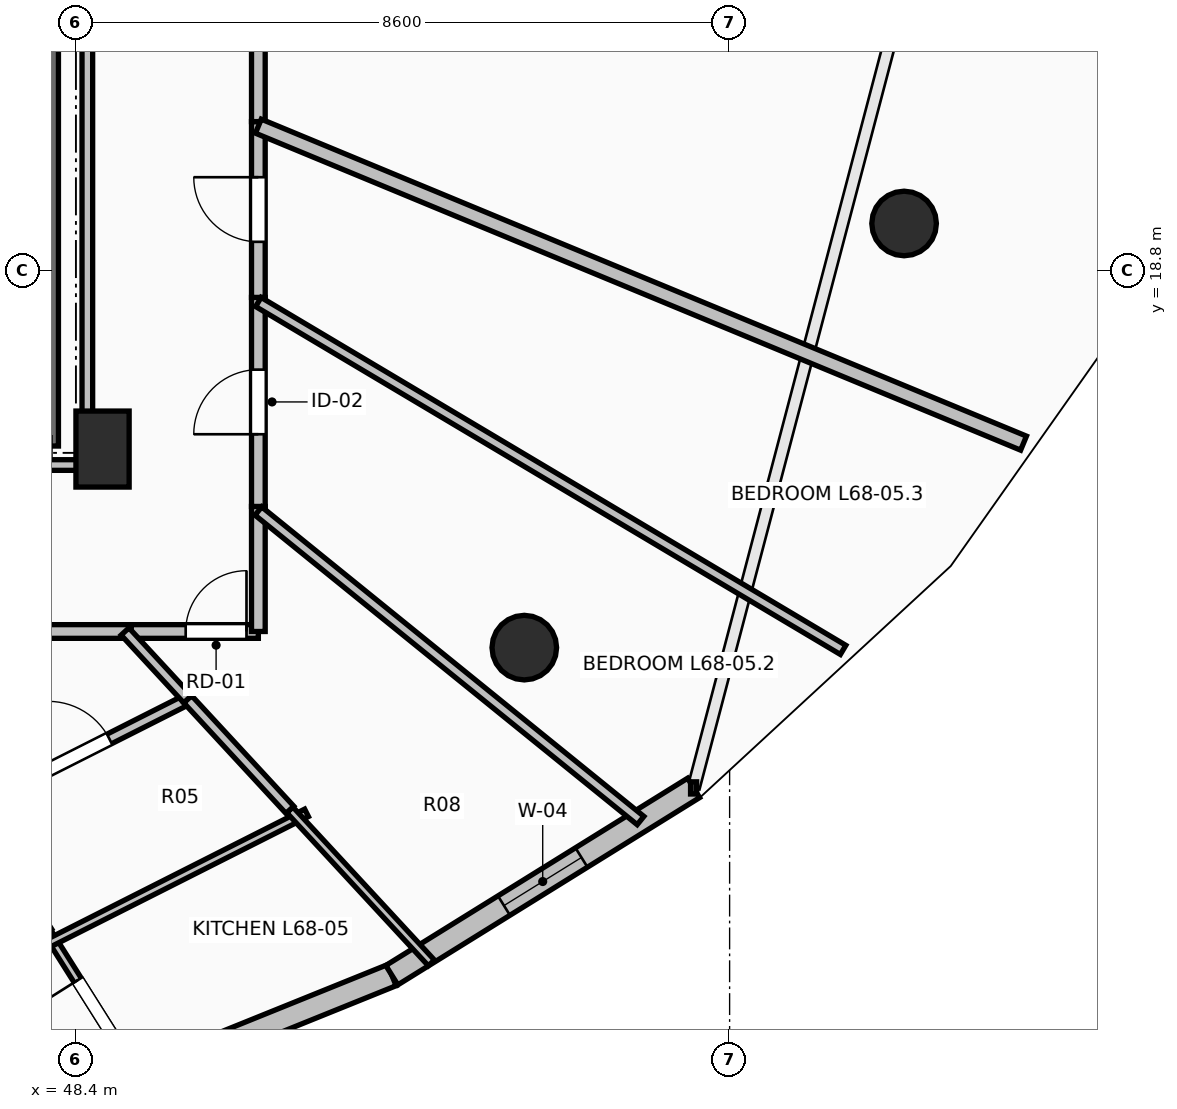
"""IFC4 building model, lengths in metres.
Left out: names, types, materials, properties, quantities, classifications, styles, units other than length and angle.
Written with IfcOpenShell. Run it as: python <this file> out.ifc"""

import sys

from ifc_helpers import new_model, si_unit, direction, frame, frame_2d, origin, origin_2d, place, context, subcontext, project, spatial, rectangle, circle, extrude, element, fill, save


model = new_model("IFC4")
c1 = context("Model", 3, precision=1e-05, world=origin(), true_north=direction((0.0, 1.0)))
c2 = subcontext(c1, "Body", "Model", "MODEL_VIEW")
j1 = project(units=[si_unit("LENGTHUNIT", "METRE"), si_unit("PLANEANGLEUNIT", "RADIAN")], contexts=[c1])
p1 = place(None, origin())
s1 = spatial("IfcSite", under=j1, at=p1, CompositionType="ELEMENT")
p2 = place(p1, origin())
s2 = spatial("IfcBuilding", under=s1, at=p2, CompositionType="ELEMENT")
p3 = place(p2, frame((0.0, 0.0, 252.0)))
s3 = spatial("IfcBuildingStorey", under=s2, at=p3, CompositionType="ELEMENT", Elevation=252.0)
for number, where, z_axis, x_axis in (
    (1, (54.299, 13.838, 0.0), (0.0, 0.0, 1.0), (0.707, -0.707, 0.0)),
    (2, (59.295, 19.418, 0.0), (0.0, 0.0, 1.0), (0.924, -0.383, 0.0)),
):
    element("IfcColumn", number, at=place(p3, frame(where, z_axis=z_axis, x_axis=x_axis)), inside=s3, PredefinedType="COLUMN", context=c2, shape_type="SweptSolid", body=[
        extrude(circle(Radius=0.425, at=origin_2d()), origin(), (0.0, 0.0, 1.0), 3.55),
    ])
p4 = place(p3, frame((48.75, 16.45, 0.0), z_axis=(0.0, 0.0, 1.0), x_axis=(1.0, 0.0, 0.0)))
e3 = element("IfcColumn", 3, at=p4, inside=s3, PredefinedType="PILASTER", context=c2, shape_type="SweptSolid", body=[
    extrude(rectangle(XDim=0.7, YDim=1.0, at=origin_2d()), origin(), (0.0, 0.0, 1.0), 3.55),
])
p5 = place(p3, frame((48.026, 7.698, 0.0), z_axis=(0.0, 0.0, 1.0), x_axis=(0.927147375511, 0.374696869594, 0.0)))
e4 = element("IfcWall", 4, at=p5, inside=s3, PredefinedType="STANDARD", context=c2, shape_type="SweptSolid", body=[
    extrude(rectangle(XDim=4.885, YDim=0.3, at=frame_2d((2.443, 0.0))), origin(), (0.0, 0.0, 1.0), 3.29),
])
p6 = place(p3, frame((52.556, 9.529, 0.0), z_axis=(0.0, 0.0, 1.0), x_axis=(0.849702323036, 0.527262707032, 0.0)))
e5 = element("IfcWall", 5, at=p6, inside=s3, PredefinedType="STANDARD", context=c2, shape_type="SweptSolid", body=[
    extrude(rectangle(XDim=4.672, YDim=0.3, at=frame_2d((2.336, 0.0))), origin(), (0.0, 0.0, 1.0), 3.29),
])
p7 = place(p6, frame((1.736, 0.0, 0.85)))
e6 = element("IfcOpeningElement", 6, at=p7, cuts=e5, PredefinedType="OPENING", context=c2, shape_type="SweptSolid", body=[
    extrude(rectangle(XDim=1.2, YDim=1.95, at=frame_2d((0.6, 0.975))), frame((0.0, 0.165, 0.0), z_axis=(0.0, -1.0, 0.0), x_axis=(1.0, 0.0, 0.0)), (0.0, 0.0, 1.0), 0.33),
])
p8 = place(p3, frame((48.06, 23.91, 0.0), z_axis=(0.0, 0.0, 1.0), x_axis=(0.0, -1.0, 0.0)))
e7 = element("IfcWall", 7, at=p8, inside=s3, PredefinedType="SOLIDWALL", context=c2, shape_type="SweptSolid", body=[
    extrude(rectangle(XDim=7.42, YDim=0.22, at=frame_2d((3.71, 0.0))), origin(), (0.0, 0.0, 1.0), 3.29),
])
p9 = place(p3, frame((45.237, 14.05, 0.0), z_axis=(0.0, 0.0, 1.0), x_axis=(1.0, 0.0, 0.0)))
e8 = element("IfcWall", 8, at=p9, inside=s3, PredefinedType="PARTITIONING", context=c2, shape_type="SweptSolid", body=[
    extrude(rectangle(XDim=3.891, YDim=0.18, at=frame_2d((1.945, 0.0))), origin(), (0.0, 0.0, 1.0), 2.482),
])
p10 = place(p9, frame((1.446, 0.0, 0.0)))
e9 = element("IfcOpeningElement", 9, at=p10, cuts=e8, PredefinedType="OPENING", context=c2, shape_type="SweptSolid", body=[
    extrude(rectangle(XDim=1.0, YDim=2.15, at=frame_2d((0.5, 1.075))), frame((0.0, 0.105, 0.0), z_axis=(0.0, -1.0, 0.0), x_axis=(1.0, 0.0, 0.0)), (0.0, 0.0, 1.0), 0.21),
])
p11 = place(p3, frame((49.128, 14.05, 0.0), z_axis=(0.0, 0.0, 1.0), x_axis=(1.0, 0.0, 0.0)))
e10 = element("IfcWall", 10, at=p11, inside=s3, PredefinedType="PARTITIONING", context=c2, shape_type="SweptSolid", body=[
    extrude(rectangle(XDim=1.672, YDim=0.18, at=frame_2d((0.836, 0.0))), origin(), (0.0, 0.0, 1.0), 2.972),
])
p12 = place(p11, frame((0.716, 0.0, 0.0)))
e11 = element("IfcOpeningElement", 11, at=p12, cuts=e10, PredefinedType="OPENING", context=c2, shape_type="SweptSolid", body=[
    extrude(rectangle(XDim=0.8, YDim=2.05, at=frame_2d((0.4, 1.025))), frame((0.0, 0.105, 0.0), z_axis=(0.0, -1.0, 0.0), x_axis=(1.0, 0.0, 0.0)), (0.0, 0.0, 1.0), 0.21),
])
p13 = place(p3, frame((50.8, 14.05, 0.0), z_axis=(0.0, 0.0, 1.0), x_axis=(0.0, 1.0, 0.0)))
e12 = element("IfcWall", 12, at=p13, inside=s3, PredefinedType="PARTITIONING", context=c2, shape_type="SweptSolid", body=[
    extrude(rectangle(XDim=1.645, YDim=0.18, at=frame_2d((0.823, 0.0))), origin(), (0.0, 0.0, 1.0), 2.482),
])
p14 = place(p3, frame((50.8, 15.695, 0.0), z_axis=(0.0, 0.0, 1.0), x_axis=(0.0, 1.0, 0.0)))
e13 = element("IfcWall", 13, at=p14, inside=s3, PredefinedType="PARTITIONING", context=c2, shape_type="SweptSolid", body=[
    extrude(rectangle(XDim=2.75, YDim=0.18, at=frame_2d((1.375, 0.0))), origin(), (0.0, 0.0, 1.0), 2.482),
])
p15 = place(p14, frame((0.95, 0.0, 0.0)))
e14 = element("IfcOpeningElement", 14, at=p15, cuts=e13, PredefinedType="OPENING", context=c2, shape_type="SweptSolid", body=[
    extrude(rectangle(XDim=0.85, YDim=2.1, at=frame_2d((0.425, 1.05))), frame((0.0, 0.105, 0.0), z_axis=(0.0, -1.0, 0.0), x_axis=(1.0, 0.0, 0.0)), (0.0, 0.0, 1.0), 0.21),
])
p16 = place(p3, frame((50.8, 18.445, 0.0), z_axis=(0.0, 0.0, 1.0), x_axis=(0.0, 1.0, 0.0)))
e15 = element("IfcWall", 15, at=p16, inside=s3, PredefinedType="PARTITIONING", context=c2, shape_type="SweptSolid", body=[
    extrude(rectangle(XDim=2.313, YDim=0.18, at=frame_2d((1.156, 0.0))), origin(), (0.0, 0.0, 1.0), 3.022),
])
p17 = place(p16, frame((0.731, 0.0, 0.0)))
e16 = element("IfcOpeningElement", 16, at=p17, cuts=e15, PredefinedType="OPENING", context=c2, shape_type="SweptSolid", body=[
    extrude(rectangle(XDim=0.85, YDim=2.1, at=frame_2d((0.425, 1.05))), frame((0.0, 0.105, 0.0), z_axis=(0.0, -1.0, 0.0), x_axis=(1.0, 0.0, 0.0)), (0.0, 0.0, 1.0), 0.21),
])
p18 = place(p3, frame((50.8, 20.758, 0.0), z_axis=(0.0, 0.0, 1.0), x_axis=(0.0, 1.0, 0.0)))
e17 = element("IfcWall", 17, at=p18, inside=s3, PredefinedType="PARTITIONING", context=c2, shape_type="SweptSolid", body=[
    extrude(rectangle(XDim=10.609, YDim=0.18, at=frame_2d((5.304, 0.0))), origin(), (0.0, 0.0, 1.0), 2.482),
])
p19 = place(p18, frame((4.804, 0.0, 0.0)))
e18 = element("IfcOpeningElement", 18, at=p19, cuts=e17, PredefinedType="OPENING", context=c2, shape_type="SweptSolid", body=[
    extrude(rectangle(XDim=1.0, YDim=2.15, at=frame_2d((0.5, 1.075))), frame((0.0, 0.105, 0.0), z_axis=(0.0, -1.0, 0.0), x_axis=(1.0, 0.0, 0.0)), (0.0, 0.0, 1.0), 0.21),
])
p20 = place(p3, frame((49.303, 8.067, 0.0), z_axis=(0.0, 0.0, 1.0), x_axis=(-0.53356042882, 0.845761945702, 0.0)))
e19 = element("IfcWall", 19, at=p20, inside=s3, PredefinedType="PARTITIONING", context=c2, shape_type="SweptSolid", body=[
    extrude(rectangle(XDim=2.4, YDim=0.11, at=frame_2d((1.2, 0.0))), origin(), (0.0, 0.0, 1.0), 3.29),
])
p21 = place(p20, frame((0.75, 0.0, 0.0)))
e20 = element("IfcOpeningElement", 20, at=p21, cuts=e19, PredefinedType="OPENING", context=c2, shape_type="SweptSolid", body=[
    extrude(rectangle(XDim=0.9, YDim=2.1, at=frame_2d((0.45, 1.05))), frame((0.0, 0.07, 0.0), z_axis=(0.0, -1.0, 0.0), x_axis=(1.0, 0.0, 0.0)), (0.0, 0.0, 1.0), 0.14),
])
p22 = place(p3, frame((47.006, 11.71, 0.0), z_axis=(0.0, 0.0, 1.0), x_axis=(0.892487089344, 0.451072937955, 0.0)))
e21 = element("IfcWall", 21, at=p22, inside=s3, PredefinedType="PARTITIONING", context=c2, shape_type="SweptSolid", body=[
    extrude(rectangle(XDim=3.21, YDim=0.14, at=frame_2d((1.605, 0.0))), origin(), (0.0, 0.0, 1.0), 2.482),
])
p23 = place(p22, frame((1.155, 0.0, 0.0)))
e22 = element("IfcOpeningElement", 22, at=p23, cuts=e21, PredefinedType="OPENING", context=c2, shape_type="SweptSolid", body=[
    extrude(rectangle(XDim=0.9, YDim=2.1, at=frame_2d((0.45, 1.05))), frame((0.0, 0.085, 0.0), z_axis=(0.0, -1.0, 0.0), x_axis=(1.0, 0.0, 0.0)), (0.0, 0.0, 1.0), 0.17),
])
p24 = place(p3, frame((49.871, 13.158, 0.0), z_axis=(0.0, 0.0, 1.0), x_axis=(-0.679047394912, 0.734094432251, 0.0)))
e23 = element("IfcWall", 23, at=p24, inside=s3, PredefinedType="PARTITIONING", context=c2, shape_type="SweptSolid", body=[
    extrude(rectangle(XDim=1.215, YDim=0.14, at=frame_2d((0.608, 0.0))), origin(), (0.0, 0.0, 1.0), 2.972),
])
p25 = place(p3, frame((51.434, 11.664, 0.0), z_axis=(0.0, 0.0, 1.0), x_axis=(-0.892543730476, -0.450960851059, 0.0)))
e24 = element("IfcWall", 24, at=p25, inside=s3, PredefinedType="PARTITIONING", context=c2, shape_type="SweptSolid", body=[
    extrude(rectangle(XDim=3.879, YDim=0.11, at=frame_2d((1.939, 0.0))), origin(), (0.0, 0.0, 1.0), 3.29),
])
p26 = place(p3, frame((53.076, 9.69, 0.0), z_axis=(0.0, 0.0, 1.0), x_axis=(-0.678974823397, 0.734161555241, 0.0)))
e25 = element("IfcWall", 25, at=p26, inside=s3, PredefinedType="PARTITIONING", context=c2, shape_type="SweptSolid", body=[
    extrude(rectangle(XDim=2.743, YDim=0.11, at=frame_2d((1.372, 0.0))), origin(), (0.0, 0.0, 1.0), 3.29),
])
p27 = place(p3, frame((51.215, 11.704, 0.0), z_axis=(0.0, 0.0, 1.0), x_axis=(-0.678746140468, 0.734372982073, 0.0)))
e26 = element("IfcWall", 26, at=p27, inside=s3, PredefinedType="PARTITIONING", context=c2, shape_type="SweptSolid", body=[
    extrude(rectangle(XDim=1.979, YDim=0.14, at=frame_2d((0.99, 0.0))), origin(), (0.0, 0.0, 1.0), 2.874),
])
p28 = place(p3, frame((55.828, 11.563, 0.0), z_axis=(0.0, 0.0, 1.0), x_axis=(-0.777103372697, 0.62937298015, 0.0)))
e27 = element("IfcWall", 27, at=p28, inside=s3, PredefinedType="PARTITIONING", context=c2, shape_type="SweptSolid", body=[
    extrude(rectangle(XDim=6.47, YDim=0.14, at=frame_2d((3.235, 0.0))), origin(), (0.0, 0.0, 1.0), 2.482),
])
p29 = place(p3, frame((58.493, 13.808, 0.0), z_axis=(0.0, 0.0, 1.0), x_axis=(-0.859400180079, 0.511303560011, 0.0)))
e28 = element("IfcWall", 28, at=p29, inside=s3, PredefinedType="PARTITIONING", context=c2, shape_type="SweptSolid", body=[
    extrude(rectangle(XDim=8.951, YDim=0.14, at=frame_2d((4.476, 0.0))), origin(), (0.0, 0.0, 1.0), 2.874),
])
p30 = place(p3, frame((60.867, 16.528, 0.0), z_axis=(0.0, 0.0, 1.0), x_axis=(-0.923877013663, 0.382689513347, 0.0)))
e29 = element("IfcWall", 29, at=p30, inside=s3, PredefinedType="PARTITIONING", context=c2, shape_type="SweptSolid", body=[
    extrude(rectangle(XDim=10.896, YDim=0.2, at=frame_2d((5.448, 0.0))), origin(), (0.0, 0.0, 1.0), 2.874),
])
p31 = place(p3, frame((44.805, 16.24, 0.0), z_axis=(0.0, 0.0, 1.0), x_axis=(1.0, 0.0, 0.0)))
e30 = element("IfcWall", 30, at=p31, inside=s3, PredefinedType="PARTITIONING", context=c2, shape_type="SweptSolid", body=[
    extrude(rectangle(XDim=3.745, YDim=0.14, at=frame_2d((1.873, 0.0))), origin(), (0.0, 0.0, 1.0), 2.482),
])
p32 = place(p3, frame((48.55, 16.24, 0.0), z_axis=(0.0, 0.0, 1.0), x_axis=(0.0, 1.0, 0.0)))
e31 = element("IfcWall", 31, at=p32, inside=s3, PredefinedType="PARTITIONING", context=c2, shape_type="SweptSolid", body=[
    extrude(rectangle(XDim=7.514, YDim=0.14, at=frame_2d((3.757, 0.0))), origin(), (0.0, 0.0, 1.0), 2.482),
])
p33 = place(p7, origin())
e32 = element("IfcWindow", 32, at=p33, inside=s3, PartitioningType="SINGLE_PANEL", PredefinedType="WINDOW", context=c2, shape_type="SweptSolid", body=[
    extrude(rectangle(XDim=1.2, YDim=1.95, at=frame_2d((0.6, 0.975))), frame((0.0, 0.03, 0.0), z_axis=(0.0, -1.0, 0.0), x_axis=(1.0, 0.0, 0.0)), (0.0, 0.0, 1.0), 0.06),
])
fill(e6, e32)
p34 = place(p21, origin())
e33 = element("IfcDoor", 33, at=p34, inside=s3, OperationType="SINGLE_SWING_RIGHT", PredefinedType="DOOR", context=c2, shape_type="SweptSolid", body=[
    extrude(rectangle(XDim=0.9, YDim=2.1, at=frame_2d((0.45, 1.05))), frame((0.0, 0.025, 0.0), z_axis=(0.0, -1.0, 0.0), x_axis=(1.0, 0.0, 0.0)), (0.0, 0.0, 1.0), 0.05),
])
fill(e20, e33)
p35 = place(p23, origin())
e34 = element("IfcDoor", 34, at=p35, inside=s3, OperationType="SINGLE_SWING_LEFT", PredefinedType="DOOR", context=c2, shape_type="SweptSolid", body=[
    extrude(rectangle(XDim=0.9, YDim=2.1, at=frame_2d((0.45, 1.05))), frame((0.0, 0.025, 0.0), z_axis=(0.0, -1.0, 0.0), x_axis=(1.0, 0.0, 0.0)), (0.0, 0.0, 1.0), 0.05),
])
fill(e22, e34)
p36 = place(p12, origin())
e35 = element("IfcDoor", 35, at=p36, inside=s3, OperationType="SINGLE_SWING_RIGHT", PredefinedType="DOOR", context=c2, shape_type="SweptSolid", body=[
    extrude(rectangle(XDim=0.8, YDim=2.05, at=frame_2d((0.4, 1.025))), frame((0.0, 0.025, 0.0), z_axis=(0.0, -1.0, 0.0), x_axis=(1.0, 0.0, 0.0)), (0.0, 0.0, 1.0), 0.05),
])
fill(e11, e35)
p37 = place(p15, origin())
e36 = element("IfcDoor", 36, at=p37, inside=s3, OperationType="SINGLE_SWING_LEFT", PredefinedType="DOOR", context=c2, shape_type="SweptSolid", body=[
    extrude(rectangle(XDim=0.85, YDim=2.1, at=frame_2d((0.425, 1.05))), frame((0.0, 0.025, 0.0), z_axis=(0.0, -1.0, 0.0), x_axis=(1.0, 0.0, 0.0)), (0.0, 0.0, 1.0), 0.05),
])
fill(e14, e36)
p38 = place(p17, origin())
e37 = element("IfcDoor", 37, at=p38, inside=s3, OperationType="SINGLE_SWING_RIGHT", PredefinedType="DOOR", context=c2, shape_type="SweptSolid", body=[
    extrude(rectangle(XDim=0.85, YDim=2.1, at=frame_2d((0.425, 1.05))), frame((0.0, 0.025, 0.0), z_axis=(0.0, -1.0, 0.0), x_axis=(1.0, 0.0, 0.0)), (0.0, 0.0, 1.0), 0.05),
])
fill(e16, e37)
save(model, sys.argv[1])
